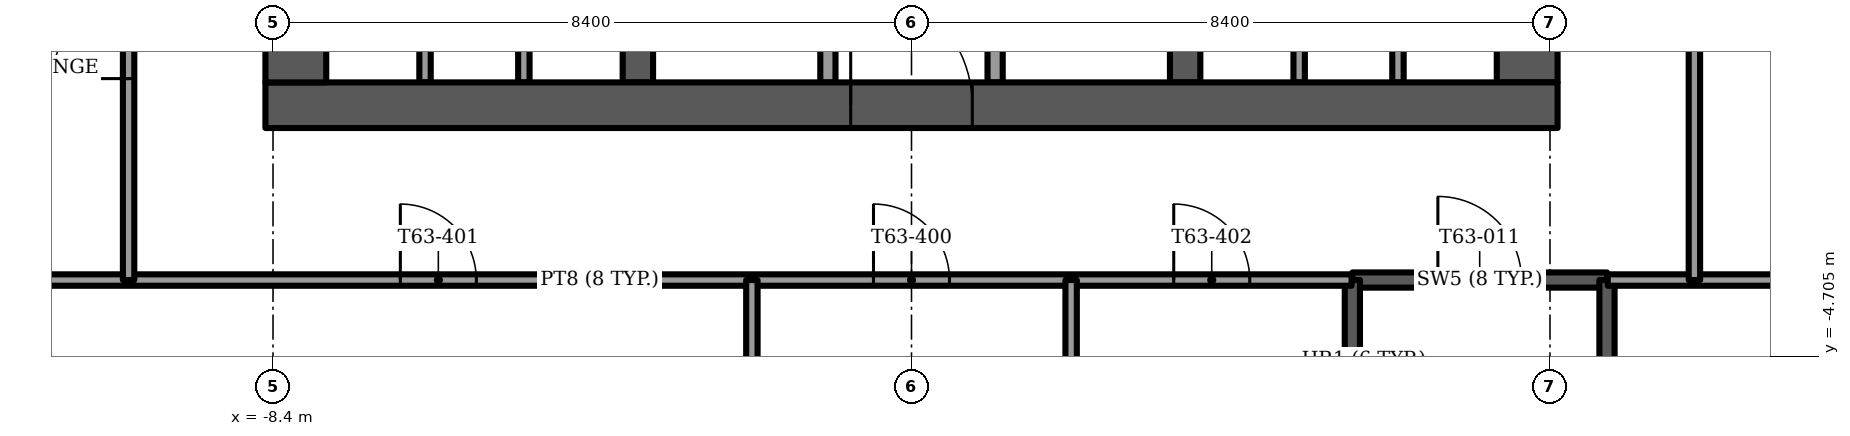
"""IFC4 building model, lengths in metres.
Left out: names, types, materials, properties, quantities, classifications, styles, units other than length and angle.
Written with IfcOpenShell. Run it as: python <this file> out.ifc"""

import sys

from ifc_helpers import new_model, si_unit, direction, frame, frame_2d, origin, place, context, subcontext, project, spatial, rectangle, extrude, element, fill, save


model = new_model("IFC4")
c1 = context("Model", 3, precision=1e-05, world=origin(), true_north=direction((0.0, 1.0)))
c2 = subcontext(c1, "Body", "Model", "MODEL_VIEW")
j1 = project(units=[si_unit("LENGTHUNIT", "METRE"), si_unit("PLANEANGLEUNIT", "RADIAN")], contexts=[c1])
p1 = place(None, origin())
s1 = spatial("IfcSite", under=j1, at=p1, CompositionType="ELEMENT")
p2 = place(p1, origin())
s2 = spatial("IfcBuilding", under=s1, at=p2, CompositionType="ELEMENT")
p3 = place(p2, frame((0.0, 0.0, 256.25)))
s3 = spatial("IfcBuildingStorey", under=s2, at=p3, CompositionType="ELEMENT", Elevation=256.25)
p4 = place(p3, frame((-8.5, -1.4, -0.3), z_axis=(0.0, 0.0, 1.0), x_axis=(1.0, 0.0, 0.0)))
e1 = element("IfcWall", 1, at=p4, inside=s3, PredefinedType="SHEAR", context=c2, shape_type="SweptSolid", body=[
    extrude(rectangle(XDim=17.0, YDim=0.6, at=frame_2d((8.5, 0.0))), origin(), (0.0, 0.0, 1.0), 3.75),
])
p5 = place(p4, frame((7.7, 0.0, 0.0)))
e2 = element("IfcOpeningElement", 2, at=p5, cuts=e1, PredefinedType="OPENING", context=c2, shape_type="SweptSolid", body=[
    extrude(rectangle(XDim=1.6, YDim=2.1, at=frame_2d((0.8, 1.05))), frame((0.0, 0.3, 0.0), z_axis=(0.0, -1.0, 0.0), x_axis=(1.0, 0.0, 0.0)), (0.0, 0.0, 1.0), 0.6),
])
p6 = place(p3, frame((-8.1, -1.1, -0.3), z_axis=(0.0, 0.0, 1.0), x_axis=(0.0, 1.0, 0.0)))
e3 = element("IfcWall", 3, at=p6, inside=s3, PredefinedType="SHEAR", context=c2, shape_type="SweptSolid", body=[
    extrude(rectangle(XDim=10.2, YDim=0.8, at=frame_2d((5.1, 0.0))), origin(), (0.0, 0.0, 1.0), 3.75),
])
p7 = place(p6, frame((8.35, 0.0, 0.0)))
e4 = element("IfcOpeningElement", 4, at=p7, cuts=e3, PredefinedType="OPENING", context=c2, shape_type="SweptSolid", body=[
    extrude(rectangle(XDim=1.1, YDim=2.1, at=frame_2d((0.55, 1.05))), frame((0.0, 0.4, 0.0), z_axis=(0.0, -1.0, 0.0), x_axis=(1.0, 0.0, 0.0)), (0.0, 0.0, 1.0), 0.8),
])
p8 = place(p3, frame((8.1, -1.1, -0.3), z_axis=(0.0, 0.0, 1.0), x_axis=(0.0, 1.0, 0.0)))
e5 = element("IfcWall", 5, at=p8, inside=s3, PredefinedType="SHEAR", context=c2, shape_type="SweptSolid", body=[
    extrude(rectangle(XDim=10.2, YDim=0.8, at=frame_2d((5.1, 0.0))), origin(), (0.0, 0.0, 1.0), 3.75),
])
p9 = place(p8, frame((8.35, 0.0, 0.0)))
e6 = element("IfcOpeningElement", 6, at=p9, cuts=e5, PredefinedType="OPENING", context=c2, shape_type="SweptSolid", body=[
    extrude(rectangle(XDim=1.1, YDim=2.1, at=frame_2d((0.55, 1.05))), frame((0.0, 0.4, 0.0), z_axis=(0.0, -1.0, 0.0), x_axis=(1.0, 0.0, 0.0)), (0.0, 0.0, 1.0), 0.8),
])
for number, where, z_axis, x_axis in (
    (7, (-3.6, -1.1, -0.3), (0.0, 0.0, 1.0), (0.0, 1.0, 0.0)),
    (8, (3.6, -1.1, -0.3), (0.0, 0.0, 1.0), (0.0, 1.0, 0.0)),
):
    element("IfcWall", number, at=place(p3, frame(where, z_axis=z_axis, x_axis=x_axis)), inside=s3, PredefinedType="SHEAR", context=c2, shape_type="SweptSolid", body=[
        extrude(rectangle(XDim=10.2, YDim=0.4, at=frame_2d((5.1, 0.0))), origin(), (0.0, 0.0, 1.0), 3.75),
    ])
p10 = place(p3, frame((-15.246, -1.444, 0.0), z_axis=(0.0, 0.0, 1.0), x_axis=(0.500005990458, -0.866021945164, 0.0)))
e9 = element("IfcWall", 9, at=p10, inside=s3, PredefinedType="SOLIDWALL", context=c2, shape_type="SweptSolid", body=[
    extrude(rectangle(XDim=12.745, YDim=0.15, at=frame_2d((6.373, 0.0))), origin(), (0.0, 0.0, 1.0), 3.45),
])
p11 = place(p10, frame((2.93, 0.0, 0.15)))
e10 = element("IfcOpeningElement", 10, at=p11, cuts=e9, PredefinedType="OPENING", context=c2, shape_type="SweptSolid", body=[
    extrude(rectangle(XDim=1.5, YDim=2.85, at=frame_2d((0.75, 1.425))), frame((0.0, 0.075, 0.0), z_axis=(0.0, -1.0, 0.0), x_axis=(1.0, 0.0, 0.0)), (0.0, 0.0, 1.0), 0.15),
])
p12 = place(p10, frame((4.673, 0.0, 0.15)))
e11 = element("IfcOpeningElement", 11, at=p12, cuts=e9, PredefinedType="OPENING", context=c2, shape_type="SweptSolid", body=[
    extrude(rectangle(XDim=1.4, YDim=2.85, at=frame_2d((0.7, 1.425))), frame((0.0, 0.075, 0.0), z_axis=(0.0, -1.0, 0.0), x_axis=(1.0, 0.0, 0.0)), (0.0, 0.0, 1.0), 0.15),
])
p13 = place(p10, frame((6.673, 0.0, 0.15)))
e12 = element("IfcOpeningElement", 12, at=p13, cuts=e9, PredefinedType="OPENING", context=c2, shape_type="SweptSolid", body=[
    extrude(rectangle(XDim=1.5, YDim=2.85, at=frame_2d((0.75, 1.425))), frame((0.0, 0.075, 0.0), z_axis=(0.0, -1.0, 0.0), x_axis=(1.0, 0.0, 0.0)), (0.0, 0.0, 1.0), 0.15),
])
p14 = place(p10, frame((8.873, 0.0, 0.15)))
e13 = element("IfcOpeningElement", 13, at=p14, cuts=e9, PredefinedType="OPENING", context=c2, shape_type="SweptSolid", body=[
    extrude(rectangle(XDim=1.4, YDim=2.85, at=frame_2d((0.7, 1.425))), frame((0.0, 0.075, 0.0), z_axis=(0.0, -1.0, 0.0), x_axis=(1.0, 0.0, 0.0)), (0.0, 0.0, 1.0), 0.15),
])
p15 = place(p10, frame((0.286, 0.0, 0.15)))
e14 = element("IfcOpeningElement", 14, at=p15, cuts=e9, PredefinedType="OPENING", context=c2, shape_type="SweptSolid", body=[
    extrude(rectangle(XDim=1.5, YDim=2.73, at=frame_2d((0.75, 1.365))), frame((0.0, 0.075, 0.0), z_axis=(0.0, -1.0, 0.0), x_axis=(1.0, 0.0, 0.0)), (0.0, 0.0, 1.0), 0.15),
])
p16 = place(p3, frame((8.873, -12.481, 0.0), z_axis=(0.0, 0.0, 1.0), x_axis=(0.500005990458, 0.866021945164, 0.0)))
e15 = element("IfcWall", 15, at=p16, inside=s3, PredefinedType="SOLIDWALL", context=c2, shape_type="SweptSolid", body=[
    extrude(rectangle(XDim=12.745, YDim=0.15, at=frame_2d((6.373, 0.0))), origin(), (0.0, 0.0, 1.0), 3.45),
])
p17 = place(p16, frame((2.473, 0.0, 0.15)))
e16 = element("IfcOpeningElement", 16, at=p17, cuts=e15, PredefinedType="OPENING", context=c2, shape_type="SweptSolid", body=[
    extrude(rectangle(XDim=1.5, YDim=2.85, at=frame_2d((0.75, 1.425))), frame((0.0, 0.075, 0.0), z_axis=(0.0, -1.0, 0.0), x_axis=(1.0, 0.0, 0.0)), (0.0, 0.0, 1.0), 0.15),
])
p18 = place(p16, frame((4.673, 0.0, 0.0)))
e17 = element("IfcOpeningElement", 17, at=p18, cuts=e15, PredefinedType="OPENING", context=c2, shape_type="SweptSolid", body=[
    extrude(rectangle(XDim=1.4, YDim=2.4, at=frame_2d((0.7, 1.2))), frame((0.0, 0.075, 0.0), z_axis=(0.0, -1.0, 0.0), x_axis=(1.0, 0.0, 0.0)), (0.0, 0.0, 1.0), 0.15),
])
p19 = place(p16, frame((6.673, 0.0, 0.15)))
e18 = element("IfcOpeningElement", 18, at=p19, cuts=e15, PredefinedType="OPENING", context=c2, shape_type="SweptSolid", body=[
    extrude(rectangle(XDim=0.9, YDim=2.85, at=frame_2d((0.45, 1.425))), frame((0.0, 0.075, 0.0), z_axis=(0.0, -1.0, 0.0), x_axis=(1.0, 0.0, 0.0)), (0.0, 0.0, 1.0), 0.15),
])
p20 = place(p16, frame((7.866, 0.0, 0.0)))
e19 = element("IfcOpeningElement", 19, at=p20, cuts=e15, PredefinedType="OPENING", context=c2, shape_type="SweptSolid", body=[
    extrude(rectangle(XDim=1.4, YDim=2.4, at=frame_2d((0.7, 1.2))), frame((0.0, 0.075, 0.0), z_axis=(0.0, -1.0, 0.0), x_axis=(1.0, 0.0, 0.0)), (0.0, 0.0, 1.0), 0.15),
])
p21 = place(p16, frame((10.959, 0.0, 0.15)))
e20 = element("IfcOpeningElement", 20, at=p21, cuts=e15, PredefinedType="OPENING", context=c2, shape_type="SweptSolid", body=[
    extrude(rectangle(XDim=1.5, YDim=2.73, at=frame_2d((0.75, 1.365))), frame((0.0, 0.075, 0.0), z_axis=(0.0, -1.0, 0.0), x_axis=(1.0, 0.0, 0.0)), (0.0, 0.0, 1.0), 0.15),
])
for number, where, z_axis, x_axis in (
    (21, (-1.1, -1.1, 0.0), (0.0, 0.0, 1.0), (0.0, 1.0, 0.0)),
    (22, (1.1, -1.1, 0.0), (0.0, 0.0, 1.0), (0.0, 1.0, 0.0)),
):
    element("IfcWall", number, at=place(p3, frame(where, z_axis=z_axis, x_axis=x_axis)), inside=s3, PredefinedType="PARTITIONING", context=c2, shape_type="SweptSolid", body=[
        extrude(rectangle(XDim=2.9, YDim=0.2, at=frame_2d((1.45, 0.0))), origin(), (0.0, 0.0, 1.0), 3.45),
    ])
for number, where, z_axis, x_axis in (
    (23, (-6.4, -1.1, 0.0), (0.0, 0.0, 1.0), (0.0, 1.0, 0.0)),
    (24, (-5.1, -1.1, 0.0), (0.0, 0.0, 1.0), (0.0, 1.0, 0.0)),
    (25, (5.1, -1.1, 0.0), (0.0, 0.0, 1.0), (0.0, 1.0, 0.0)),
    (26, (6.4, -1.1, 0.0), (0.0, 0.0, 1.0), (0.0, 1.0, 0.0)),
):
    element("IfcWall", number, at=place(p3, frame(where, z_axis=z_axis, x_axis=x_axis)), inside=s3, PredefinedType="PARTITIONING", context=c2, shape_type="SweptSolid", body=[
        extrude(rectangle(XDim=2.0, YDim=0.15, at=frame_2d((1.0, 0.0))), origin(), (0.0, 0.0, 1.0), 3.45),
    ])
p22 = place(p3, frame((5.8, -3.7, -0.3), z_axis=(0.0, 0.0, 1.0), x_axis=(1.0, 0.0, 0.0)))
e27 = element("IfcWall", 27, at=p22, inside=s3, PredefinedType="SOLIDWALL", context=c2, shape_type="SweptSolid", body=[
    extrude(rectangle(XDim=3.35, YDim=0.2, at=frame_2d((1.675, 0.0))), origin(), (0.0, 0.0, 1.0), 3.75),
])
p23 = place(p22, frame((1.125, 0.0, 0.0)))
e28 = element("IfcOpeningElement", 28, at=p23, cuts=e27, PredefinedType="OPENING", context=c2, shape_type="SweptSolid", body=[
    extrude(rectangle(XDim=1.1, YDim=2.1, at=frame_2d((0.55, 1.05))), frame((0.0, 0.1, 0.0), z_axis=(0.0, -1.0, 0.0), x_axis=(1.0, 0.0, 0.0)), (0.0, 0.0, 1.0), 0.2),
])
for number, where, z_axis, x_axis in (
    (29, (5.8, -3.7, -0.3), (0.0, 0.0, 1.0), (0.0, -1.0, 0.0)),
    (30, (9.15, -3.7, -0.3), (0.0, 0.0, 1.0), (0.0, -1.0, 0.0)),
):
    element("IfcWall", number, at=place(p3, frame(where, z_axis=z_axis, x_axis=x_axis)), inside=s3, PredefinedType="SOLIDWALL", context=c2, shape_type="SweptSolid", body=[
        extrude(rectangle(XDim=7.7, YDim=0.2, at=frame_2d((3.85, 0.0))), origin(), (0.0, 0.0, 1.0), 3.75),
    ])
p24 = place(p3, frame((-13.995, -3.7, 0.0), z_axis=(0.0, 0.0, 1.0), x_axis=(1.0, 0.0, 0.0)))
e31 = element("IfcWall", 31, at=p24, inside=s3, PredefinedType="PARTITIONING", context=c2, shape_type="SweptSolid", body=[
    extrude(rectangle(XDim=19.785, YDim=0.15, at=frame_2d((9.893, 0.0))), origin(), (0.0, 0.0, 1.0), 3.45),
])
p25 = place(p24, frame((13.495, 0.0, 0.0)))
e32 = element("IfcOpeningElement", 32, at=p25, cuts=e31, PredefinedType="OPENING", context=c2, shape_type="SweptSolid", body=[
    extrude(rectangle(XDim=1.0, YDim=2.1, at=frame_2d((0.5, 1.05))), frame((0.0, 0.075, 0.0), z_axis=(0.0, -1.0, 0.0), x_axis=(1.0, 0.0, 0.0)), (0.0, 0.0, 1.0), 0.15),
])
p26 = place(p24, frame((7.27, 0.0, 0.0)))
e33 = element("IfcOpeningElement", 33, at=p26, cuts=e31, PredefinedType="OPENING", context=c2, shape_type="SweptSolid", body=[
    extrude(rectangle(XDim=1.0, YDim=2.1, at=frame_2d((0.5, 1.05))), frame((0.0, 0.075, 0.0), z_axis=(0.0, -1.0, 0.0), x_axis=(1.0, 0.0, 0.0)), (0.0, 0.0, 1.0), 0.15),
])
p27 = place(p24, frame((17.445, 0.0, 0.0)))
e34 = element("IfcOpeningElement", 34, at=p27, cuts=e31, PredefinedType="OPENING", context=c2, shape_type="SweptSolid", body=[
    extrude(rectangle(XDim=1.0, YDim=2.1, at=frame_2d((0.5, 1.05))), frame((0.0, 0.075, 0.0), z_axis=(0.0, -1.0, 0.0), x_axis=(1.0, 0.0, 0.0)), (0.0, 0.0, 1.0), 0.15),
])
p28 = place(p3, frame((9.16, -3.7, 0.0), z_axis=(0.0, 0.0, 1.0), x_axis=(1.0, 0.0, 0.0)))
e35 = element("IfcWall", 35, at=p28, inside=s3, PredefinedType="PARTITIONING", context=c2, shape_type="SweptSolid", body=[
    extrude(rectangle(XDim=4.835, YDim=0.15, at=frame_2d((2.417, 0.0))), origin(), (0.0, 0.0, 1.0), 3.45),
])
p29 = place(p3, frame((10.3, -3.7, 0.0), z_axis=(0.0, 0.0, 1.0), x_axis=(0.0, 1.0, 0.0)))
e36 = element("IfcWall", 36, at=p29, inside=s3, PredefinedType="PARTITIONING", context=c2, shape_type="SweptSolid", body=[
    extrude(rectangle(XDim=11.978, YDim=0.15, at=frame_2d((5.989, 0.0))), origin(), (0.0, 0.0, 1.0), 3.45),
])
p30 = place(p29, frame((3.7, 0.0, 0.0)))
e37 = element("IfcOpeningElement", 37, at=p30, cuts=e36, PredefinedType="OPENING", context=c2, shape_type="SweptSolid", body=[
    extrude(rectangle(XDim=1.0, YDim=2.1, at=frame_2d((0.5, 1.05))), frame((0.0, 0.075, 0.0), z_axis=(0.0, -1.0, 0.0), x_axis=(1.0, 0.0, 0.0)), (0.0, 0.0, 1.0), 0.15),
])
p31 = place(p29, frame((9.57, 0.0, 0.0)))
e38 = element("IfcOpeningElement", 38, at=p31, cuts=e36, PredefinedType="OPENING", context=c2, shape_type="SweptSolid", body=[
    extrude(rectangle(XDim=1.0, YDim=2.1, at=frame_2d((0.5, 1.05))), frame((0.0, 0.075, 0.0), z_axis=(0.0, -1.0, 0.0), x_axis=(1.0, 0.0, 0.0)), (0.0, 0.0, 1.0), 0.15),
])
for number, where, z_axis, x_axis in (
    (39, (2.1, -13.059, 0.0), (0.0, 0.0, 1.0), (0.0, 1.0, 0.0)),
    (40, (-2.1, -13.059, 0.0), (0.0, 0.0, 1.0), (0.0, 1.0, 0.0)),
):
    element("IfcWall", number, at=place(p3, frame(where, z_axis=z_axis, x_axis=x_axis)), inside=s3, PredefinedType="PARTITIONING", context=c2, shape_type="SweptSolid", body=[
        extrude(rectangle(XDim=9.359, YDim=0.15, at=frame_2d((4.68, 0.0))), origin(), (0.0, 0.0, 1.0), 3.45),
    ])
p32 = place(p3, frame((-10.3, -3.7, 0.0), z_axis=(0.0, 0.0, 1.0), x_axis=(0.0, 1.0, 0.0)))
e41 = element("IfcWall", 41, at=p32, inside=s3, PredefinedType="PARTITIONING", context=c2, shape_type="SweptSolid", body=[
    extrude(rectangle(XDim=11.978, YDim=0.15, at=frame_2d((5.989, 0.0))), origin(), (0.0, 0.0, 1.0), 3.45),
])
p33 = place(p32, frame((2.65, 0.0, 0.0)))
e42 = element("IfcOpeningElement", 42, at=p33, cuts=e41, PredefinedType="OPENING", context=c2, shape_type="SweptSolid", body=[
    extrude(rectangle(XDim=1.0, YDim=2.1, at=frame_2d((0.5, 1.05))), frame((0.0, 0.075, 0.0), z_axis=(0.0, -1.0, 0.0), x_axis=(1.0, 0.0, 0.0)), (0.0, 0.0, 1.0), 0.15),
])
p34 = place(p32, frame((8.52, 0.0, 0.0)))
e43 = element("IfcOpeningElement", 43, at=p34, cuts=e41, PredefinedType="OPENING", context=c2, shape_type="SweptSolid", body=[
    extrude(rectangle(XDim=1.0, YDim=2.1, at=frame_2d((0.5, 1.05))), frame((0.0, 0.075, 0.0), z_axis=(0.0, -1.0, 0.0), x_axis=(1.0, 0.0, 0.0)), (0.0, 0.0, 1.0), 0.15),
])
p35 = place(p5, origin())
e44 = element("IfcDoor", 44, at=p35, inside=s3, OperationType="DOUBLE_DOOR_SINGLE_SWING", PredefinedType="DOOR", context=c2, shape_type="SweptSolid", body=[
    extrude(rectangle(XDim=1.6, YDim=2.1, at=frame_2d((0.8, 1.05))), frame((0.0, 0.025, 0.0), z_axis=(0.0, -1.0, 0.0), x_axis=(1.0, 0.0, 0.0)), (0.0, 0.0, 1.0), 0.05),
])
fill(e2, e44)
p36 = place(p23, origin())
e45 = element("IfcDoor", 45, at=p36, inside=s3, OperationType="SINGLE_SWING_LEFT", PredefinedType="DOOR", context=c2, shape_type="SweptSolid", body=[
    extrude(rectangle(XDim=1.1, YDim=2.1, at=frame_2d((0.55, 1.05))), frame((0.0, 0.025, 0.0), z_axis=(0.0, -1.0, 0.0), x_axis=(1.0, 0.0, 0.0)), (0.0, 0.0, 1.0), 0.05),
])
fill(e28, e45)
p37 = place(p25, origin())
e46 = element("IfcDoor", 46, at=p37, inside=s3, OperationType="SINGLE_SWING_LEFT", PredefinedType="DOOR", context=c2, shape_type="SweptSolid", body=[
    extrude(rectangle(XDim=1.0, YDim=2.1, at=frame_2d((0.5, 1.05))), frame((0.0, 0.025, 0.0), z_axis=(0.0, -1.0, 0.0), x_axis=(1.0, 0.0, 0.0)), (0.0, 0.0, 1.0), 0.05),
])
fill(e32, e46)
p38 = place(p26, origin())
e47 = element("IfcDoor", 47, at=p38, inside=s3, OperationType="SINGLE_SWING_RIGHT", PredefinedType="DOOR", context=c2, shape_type="SweptSolid", body=[
    extrude(rectangle(XDim=1.0, YDim=2.1, at=frame_2d((0.5, 1.05))), frame((0.0, 0.025, 0.0), z_axis=(0.0, -1.0, 0.0), x_axis=(1.0, 0.0, 0.0)), (0.0, 0.0, 1.0), 0.05),
])
fill(e33, e47)
p39 = place(p27, origin())
e48 = element("IfcDoor", 48, at=p39, inside=s3, OperationType="SINGLE_SWING_LEFT", PredefinedType="DOOR", context=c2, shape_type="SweptSolid", body=[
    extrude(rectangle(XDim=1.0, YDim=2.1, at=frame_2d((0.5, 1.05))), frame((0.0, 0.025, 0.0), z_axis=(0.0, -1.0, 0.0), x_axis=(1.0, 0.0, 0.0)), (0.0, 0.0, 1.0), 0.05),
])
fill(e34, e48)
p40 = place(p33, origin())
e49 = element("IfcDoor", 49, at=p40, inside=s3, OperationType="SINGLE_SWING_RIGHT", PredefinedType="DOOR", context=c2, shape_type="SweptSolid", body=[
    extrude(rectangle(XDim=1.0, YDim=2.1, at=frame_2d((0.5, 1.05))), frame((0.0, 0.025, 0.0), z_axis=(0.0, -1.0, 0.0), x_axis=(1.0, 0.0, 0.0)), (0.0, 0.0, 1.0), 0.05),
])
fill(e42, e49)
save(model, sys.argv[1])
